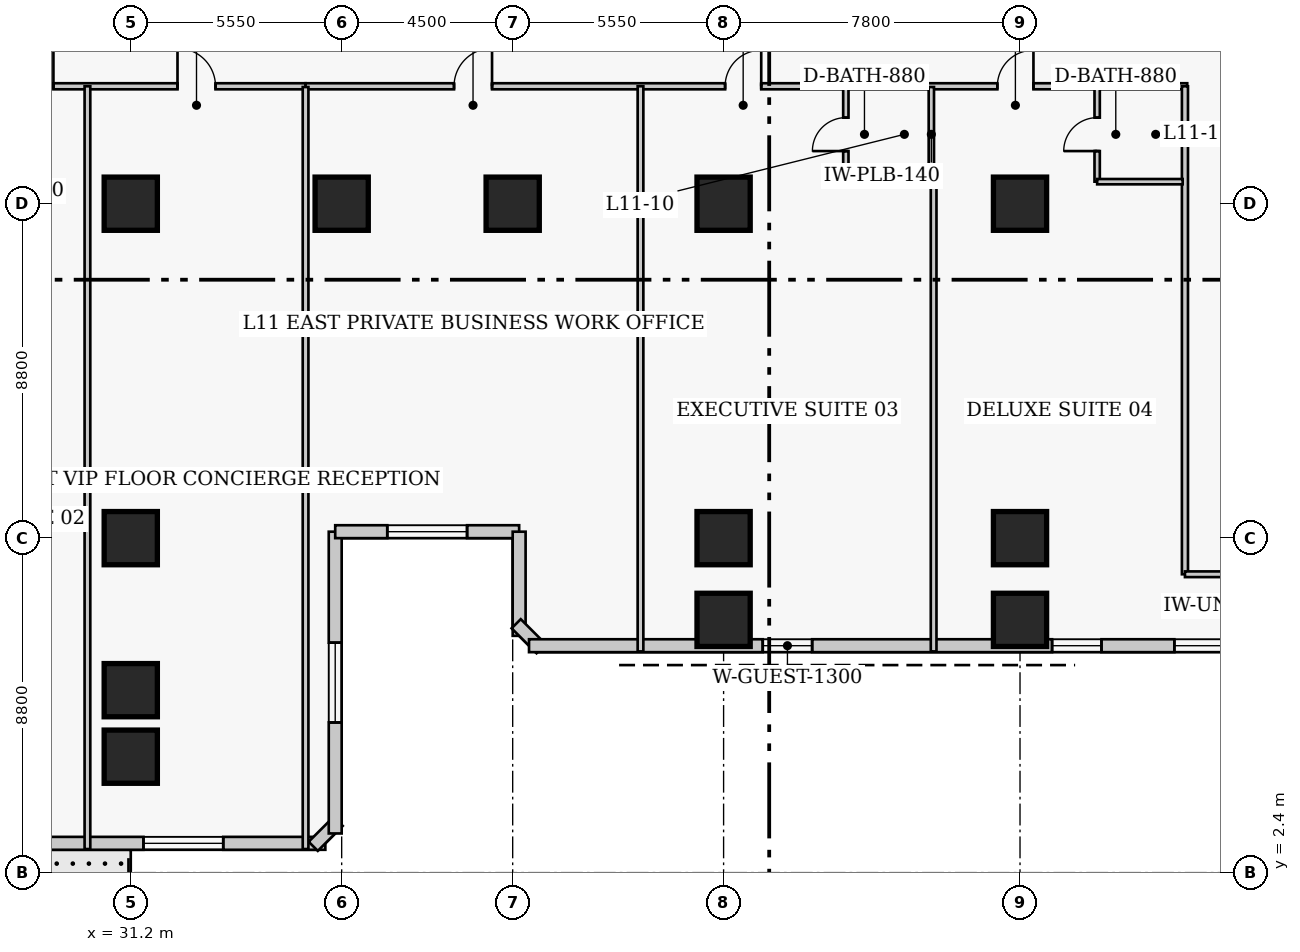
"""IFC4 building model, lengths in metres.
Left out: names, types, materials, properties, quantities, classifications, styles, units other than length and angle.
Written with IfcOpenShell. Run it as: python <this file> out.ifc"""

import sys

from ifc_helpers import new_model, si_unit, direction, frame, frame_2d, origin, origin_2d, place, context, subcontext, project, spatial, rectangle, extrude, element, fill, save


model = new_model("IFC4")
c1 = context("Model", 3, precision=1e-05, world=origin(), true_north=direction((0.0, 1.0)))
c2 = subcontext(c1, "Body", "Model", "MODEL_VIEW")
j1 = project(units=[si_unit("LENGTHUNIT", "METRE"), si_unit("PLANEANGLEUNIT", "RADIAN")], contexts=[c1])
p1 = place(None, origin())
s1 = spatial("IfcSite", under=j1, at=p1, CompositionType="ELEMENT")
p2 = place(p1, origin())
s2 = spatial("IfcBuilding", under=s1, at=p2, CompositionType="ELEMENT")
p3 = place(p2, frame((0.0, 0.0, 48.8)))
s3 = spatial("IfcBuildingStorey", under=s2, at=p3, CompositionType="ELEMENT", Elevation=48.8)
for number, where, z_axis, x_axis in (
    (1, (31.2, 11.2, 0.0), (0.0, 0.0, 1.0), (1.0, 0.0, 0.0)),
    (2, (31.2, 20.0, 0.0), (0.0, 0.0, 1.0), (1.0, 0.0, 0.0)),
    (3, (36.75, 20.0, 0.0), (0.0, 0.0, 1.0), (1.0, 0.0, 0.0)),
    (4, (41.25, 20.0, 0.0), (0.0, 0.0, 1.0), (1.0, 0.0, 0.0)),
    (5, (46.8, 11.2, 0.0), (0.0, 0.0, 1.0), (1.0, 0.0, 0.0)),
    (6, (46.8, 20.0, 0.0), (0.0, 0.0, 1.0), (1.0, 0.0, 0.0)),
    (7, (54.6, 11.2, 0.0), (0.0, 0.0, 1.0), (1.0, 0.0, 0.0)),
    (8, (54.6, 20.0, 0.0), (0.0, 0.0, 1.0), (1.0, 0.0, 0.0)),
    (9, (31.2, 7.2, 0.0), (0.0, 0.0, 1.0), (1.0, 0.0, 0.0)),
    (10, (31.2, 5.45, 0.0), (0.0, 0.0, 1.0), (1.0, 0.0, 0.0)),
    (11, (46.8, 9.05, 0.0), (0.0, 0.0, 1.0), (1.0, 0.0, 0.0)),
    (12, (54.6, 9.05, 0.0), (0.0, 0.0, 1.0), (1.0, 0.0, 0.0)),
):
    element("IfcColumn", number, at=place(p3, frame(where, z_axis=z_axis, x_axis=x_axis)), inside=s3, PredefinedType="COLUMN", context=c2, shape_type="SweptSolid", body=[
        extrude(rectangle(XDim=1.4, YDim=1.4, at=origin_2d()), origin(), (0.0, 0.0, 1.0), 3.8),
    ])
p4 = place(p3, frame((6.43, 3.17, 0.0), z_axis=(0.0, 0.0, 1.0), x_axis=(1.0, 0.0, 0.0)))
e13 = element("IfcWall", 13, at=p4, inside=s3, PredefinedType="SOLIDWALL", context=c2, shape_type="SweptSolid", body=[
    extrude(rectangle(XDim=29.89, YDim=0.34, at=frame_2d((14.945, 0.0))), origin(), (0.0, 0.0, 1.0), 3.54),
])
p5 = place(p4, frame((20.17, 0.0, 0.0)))
e14 = element("IfcOpeningElement", 14, at=p5, cuts=e13, PredefinedType="OPENING", context=c2, shape_type="SweptSolid", body=[
    extrude(rectangle(XDim=1.4, YDim=2.15, at=frame_2d((0.7, 1.075))), frame((0.0, 0.18, 0.0), z_axis=(0.0, -1.0, 0.0), x_axis=(1.0, 0.0, 0.0)), (0.0, 0.0, 1.0), 0.36),
])
p6 = place(p4, frame((2.686, 0.0, 0.85)))
e15 = element("IfcOpeningElement", 15, at=p6, cuts=e13, PredefinedType="OPENING", context=c2, shape_type="SweptSolid", body=[
    extrude(rectangle(XDim=2.1, YDim=1.85, at=frame_2d((1.05, 0.925))), frame((0.0, 0.18, 0.0), z_axis=(0.0, -1.0, 0.0), x_axis=(1.0, 0.0, 0.0)), (0.0, 0.0, 1.0), 0.36),
])
p7 = place(p4, frame((25.104, 0.0, 0.85)))
e16 = element("IfcOpeningElement", 16, at=p7, cuts=e13, PredefinedType="OPENING", context=c2, shape_type="SweptSolid", body=[
    extrude(rectangle(XDim=2.1, YDim=1.85, at=frame_2d((1.05, 0.925))), frame((0.0, 0.18, 0.0), z_axis=(0.0, -1.0, 0.0), x_axis=(1.0, 0.0, 0.0)), (0.0, 0.0, 1.0), 0.36),
])
p8 = place(p4, frame((15.405, 0.0, 0.85)))
e17 = element("IfcOpeningElement", 17, at=p8, cuts=e13, PredefinedType="OPENING", context=c2, shape_type="SweptSolid", body=[
    extrude(rectangle(XDim=1.3, YDim=1.7, at=frame_2d((0.65, 0.85))), frame((0.0, 0.18, 0.0), z_axis=(0.0, -1.0, 0.0), x_axis=(1.0, 0.0, 0.0)), (0.0, 0.0, 1.0), 0.36),
])
p9 = place(p3, frame((36.001, 3.092, 0.0), z_axis=(0.0, 0.0, 1.0), x_axis=(0.707106781187, 0.707106781187, 0.0)))
e18 = element("IfcWall", 18, at=p9, inside=s3, PredefinedType="SOLIDWALL", context=c2, shape_type="SweptSolid", body=[
    extrude(rectangle(XDim=0.929, YDim=0.34, at=frame_2d((0.464, 0.0))), origin(), (0.0, 0.0, 1.0), 3.54),
])
p10 = place(p3, frame((36.58, 3.43, 0.0), z_axis=(0.0, 0.0, 1.0), x_axis=(0.0, 1.0, 0.0)))
e19 = element("IfcWall", 19, at=p10, inside=s3, PredefinedType="SOLIDWALL", context=c2, shape_type="SweptSolid", body=[
    extrude(rectangle(XDim=7.94, YDim=0.34, at=frame_2d((3.97, 0.0))), origin(), (0.0, 0.0, 1.0), 3.54),
])
p11 = place(p10, frame((2.92, 0.0, 0.85)))
e20 = element("IfcOpeningElement", 20, at=p11, cuts=e19, PredefinedType="OPENING", context=c2, shape_type="SweptSolid", body=[
    extrude(rectangle(XDim=2.1, YDim=1.85, at=frame_2d((1.05, 0.925))), frame((0.0, 0.18, 0.0), z_axis=(0.0, -1.0, 0.0), x_axis=(1.0, 0.0, 0.0)), (0.0, 0.0, 1.0), 0.36),
])
p12 = place(p3, frame((36.58, 11.37, 0.0), z_axis=(0.0, 0.0, 1.0), x_axis=(1.0, 0.0, 0.0)))
e21 = element("IfcWall", 21, at=p12, inside=s3, PredefinedType="SOLIDWALL", context=c2, shape_type="SweptSolid", body=[
    extrude(rectangle(XDim=4.84, YDim=0.34, at=frame_2d((2.42, 0.0))), origin(), (0.0, 0.0, 1.0), 3.54),
])
p13 = place(p12, frame((1.37, 0.0, 0.85)))
e22 = element("IfcOpeningElement", 22, at=p13, cuts=e21, PredefinedType="OPENING", context=c2, shape_type="SweptSolid", body=[
    extrude(rectangle(XDim=2.1, YDim=1.85, at=frame_2d((1.05, 0.925))), frame((0.0, 0.18, 0.0), z_axis=(0.0, -1.0, 0.0), x_axis=(1.0, 0.0, 0.0)), (0.0, 0.0, 1.0), 0.36),
])
p14 = place(p3, frame((41.42, 11.37, 0.0), z_axis=(0.0, 0.0, 1.0), x_axis=(0.0, -1.0, 0.0)))
e23 = element("IfcWall", 23, at=p14, inside=s3, PredefinedType="SOLIDWALL", context=c2, shape_type="SweptSolid", body=[
    extrude(rectangle(XDim=2.74, YDim=0.34, at=frame_2d((1.37, 0.0))), origin(), (0.0, 0.0, 1.0), 3.54),
])
p15 = place(p3, frame((41.342, 8.948, 0.0), z_axis=(0.0, 0.0, 1.0), x_axis=(0.707238225886, -0.706975312048, 0.0)))
e24 = element("IfcWall", 24, at=p15, inside=s3, PredefinedType="SOLIDWALL", context=c2, shape_type="SweptSolid", body=[
    extrude(rectangle(XDim=0.929, YDim=0.34, at=frame_2d((0.464, 0.0))), origin(), (0.0, 0.0, 1.0), 3.54),
])
p16 = place(p3, frame((41.68, 8.37, 0.0), z_axis=(0.0, 0.0, 1.0), x_axis=(1.0, 0.0, 0.0)))
e25 = element("IfcWall", 25, at=p16, inside=s3, PredefinedType="SOLIDWALL", context=c2, shape_type="SweptSolid", body=[
    extrude(rectangle(XDim=29.89, YDim=0.34, at=frame_2d((14.945, 0.0))), origin(), (0.0, 0.0, 1.0), 3.54),
])
p17 = place(p16, frame((16.981, 0.0, 0.85)))
e26 = element("IfcOpeningElement", 26, at=p17, cuts=e25, PredefinedType="OPENING", context=c2, shape_type="SweptSolid", body=[
    extrude(rectangle(XDim=2.1, YDim=1.85, at=frame_2d((1.05, 0.925))), frame((0.0, 0.18, 0.0), z_axis=(0.0, -1.0, 0.0), x_axis=(1.0, 0.0, 0.0)), (0.0, 0.0, 1.0), 0.36),
])
p18 = place(p16, frame((26.254, 0.0, 0.85)))
e27 = element("IfcOpeningElement", 27, at=p18, cuts=e25, PredefinedType="OPENING", context=c2, shape_type="SweptSolid", body=[
    extrude(rectangle(XDim=2.1, YDim=1.85, at=frame_2d((1.05, 0.925))), frame((0.0, 0.18, 0.0), z_axis=(0.0, -1.0, 0.0), x_axis=(1.0, 0.0, 0.0)), (0.0, 0.0, 1.0), 0.36),
])
p19 = place(p16, frame((6.15, 0.0, 0.85)))
e28 = element("IfcOpeningElement", 28, at=p19, cuts=e25, PredefinedType="OPENING", context=c2, shape_type="SweptSolid", body=[
    extrude(rectangle(XDim=1.3, YDim=1.7, at=frame_2d((0.65, 0.85))), frame((0.0, 0.18, 0.0), z_axis=(0.0, -1.0, 0.0), x_axis=(1.0, 0.0, 0.0)), (0.0, 0.0, 1.0), 0.36),
])
p20 = place(p16, frame((13.763, 0.0, 0.85)))
e29 = element("IfcOpeningElement", 29, at=p20, cuts=e25, PredefinedType="OPENING", context=c2, shape_type="SweptSolid", body=[
    extrude(rectangle(XDim=1.3, YDim=1.7, at=frame_2d((0.65, 0.85))), frame((0.0, 0.18, 0.0), z_axis=(0.0, -1.0, 0.0), x_axis=(1.0, 0.0, 0.0)), (0.0, 0.0, 1.0), 0.36),
])
p21 = place(p3, frame((19.9, 23.09, 0.0), z_axis=(0.0, 0.0, 1.0), x_axis=(1.0, 0.0, 0.0)))
e30 = element("IfcWall", 30, at=p21, inside=s3, PredefinedType="PARTITIONING", context=c2, shape_type="SweptSolid", body=[
    extrude(rectangle(XDim=15.9, YDim=0.16, at=frame_2d((7.95, 0.0))), origin(), (0.0, 0.0, 1.0), 3.54),
])
p22 = place(p21, frame((3.265, 0.0, 0.0)))
e31 = element("IfcOpeningElement", 31, at=p22, cuts=e30, PredefinedType="OPENING", context=c2, shape_type="SweptSolid", body=[
    extrude(rectangle(XDim=0.95, YDim=2.1, at=frame_2d((0.475, 1.05))), frame((0.0, 0.09, 0.0), z_axis=(0.0, -1.0, 0.0), x_axis=(1.0, 0.0, 0.0)), (0.0, 0.0, 1.0), 0.18),
])
p23 = place(p21, frame((8.315, 0.0, 0.0)))
e32 = element("IfcOpeningElement", 32, at=p23, cuts=e30, PredefinedType="OPENING", context=c2, shape_type="SweptSolid", body=[
    extrude(rectangle(XDim=0.95, YDim=2.1, at=frame_2d((0.475, 1.05))), frame((0.0, 0.09, 0.0), z_axis=(0.0, -1.0, 0.0), x_axis=(1.0, 0.0, 0.0)), (0.0, 0.0, 1.0), 0.18),
])
p24 = place(p21, frame((12.53, 0.0, 0.0)))
e33 = element("IfcOpeningElement", 33, at=p24, cuts=e30, PredefinedType="OPENING", context=c2, shape_type="SweptSolid", body=[
    extrude(rectangle(XDim=1.0, YDim=2.15, at=frame_2d((0.5, 1.075))), frame((0.0, 0.09, 0.0), z_axis=(0.0, -1.0, 0.0), x_axis=(1.0, 0.0, 0.0)), (0.0, 0.0, 1.0), 0.18),
])
p25 = place(p3, frame((35.8, 23.09, 0.0), z_axis=(0.0, 0.0, 1.0), x_axis=(1.0, 0.0, 0.0)))
e34 = element("IfcWall", 34, at=p25, inside=s3, PredefinedType="PARTITIONING", context=c2, shape_type="SweptSolid", body=[
    extrude(rectangle(XDim=23.2, YDim=0.16, at=frame_2d((11.6, 0.0))), origin(), (0.0, 0.0, 1.0), 3.54),
])
p26 = place(p25, frame((3.907, 0.0, 0.0)))
e35 = element("IfcOpeningElement", 35, at=p26, cuts=e34, PredefinedType="OPENING", context=c2, shape_type="SweptSolid", body=[
    extrude(rectangle(XDim=1.0, YDim=2.15, at=frame_2d((0.5, 1.075))), frame((0.0, 0.09, 0.0), z_axis=(0.0, -1.0, 0.0), x_axis=(1.0, 0.0, 0.0)), (0.0, 0.0, 1.0), 0.18),
])
p27 = place(p25, frame((11.04, 0.0, 0.0)))
e36 = element("IfcOpeningElement", 36, at=p27, cuts=e34, PredefinedType="OPENING", context=c2, shape_type="SweptSolid", body=[
    extrude(rectangle(XDim=0.95, YDim=2.1, at=frame_2d((0.475, 1.05))), frame((0.0, 0.09, 0.0), z_axis=(0.0, -1.0, 0.0), x_axis=(1.0, 0.0, 0.0)), (0.0, 0.0, 1.0), 0.18),
])
p28 = place(p25, frame((18.203, 0.0, 0.0)))
e37 = element("IfcOpeningElement", 37, at=p28, cuts=e34, PredefinedType="OPENING", context=c2, shape_type="SweptSolid", body=[
    extrude(rectangle(XDim=0.95, YDim=2.1, at=frame_2d((0.475, 1.05))), frame((0.0, 0.09, 0.0), z_axis=(0.0, -1.0, 0.0), x_axis=(1.0, 0.0, 0.0)), (0.0, 0.0, 1.0), 0.18),
])
p29 = place(p3, frame((58.94, 10.25, 0.0), z_axis=(0.0, 0.0, 1.0), x_axis=(0.0, 1.0, 0.0)))
e38 = element("IfcWall", 38, at=p29, inside=s3, PredefinedType="PARTITIONING", context=c2, shape_type="SweptSolid", body=[
    extrude(rectangle(XDim=12.84, YDim=0.16, at=frame_2d((6.42, 0.0))), origin(), (0.0, 0.0, 1.0), 3.54),
])
p30 = place(p3, frame((58.94, 10.25, 0.0), z_axis=(0.0, 0.0, 1.0), x_axis=(1.0, 0.0, 0.0)))
e39 = element("IfcWall", 39, at=p30, inside=s3, PredefinedType="PARTITIONING", context=c2, shape_type="SweptSolid", body=[
    extrude(rectangle(XDim=2.22, YDim=0.15, at=frame_2d((1.11, 0.0))), origin(), (0.0, 0.0, 1.0), 3.54),
])
p31 = place(p3, frame((30.06, 3.02, 0.0), z_axis=(0.0, 0.0, 1.0), x_axis=(0.0, 1.0, 0.0)))
e40 = element("IfcWall", 40, at=p31, inside=s3, PredefinedType="PARTITIONING", context=c2, shape_type="SweptSolid", body=[
    extrude(rectangle(XDim=20.07, YDim=0.15, at=frame_2d((10.035, 0.0))), origin(), (0.0, 0.0, 1.0), 3.54),
])
p32 = place(p3, frame((35.8, 3.02, 0.0), z_axis=(0.0, 0.0, 1.0), x_axis=(0.0, 1.0, 0.0)))
e41 = element("IfcWall", 41, at=p32, inside=s3, PredefinedType="PARTITIONING", context=c2, shape_type="SweptSolid", body=[
    extrude(rectangle(XDim=20.05, YDim=0.15, at=frame_2d((10.025, 0.0))), origin(), (0.0, 0.0, 1.0), 3.54),
])
p33 = place(p3, frame((44.613, 8.22, 0.0), z_axis=(0.0, 0.0, 1.0), x_axis=(0.0, 1.0, 0.0)))
e42 = element("IfcWall", 42, at=p33, inside=s3, PredefinedType="PARTITIONING", context=c2, shape_type="SweptSolid", body=[
    extrude(rectangle(XDim=14.87, YDim=0.15, at=frame_2d((7.435, 0.0))), origin(), (0.0, 0.0, 1.0), 3.54),
])
p34 = place(p3, frame((50.017, 20.58, 0.0), z_axis=(0.0, 0.0, 1.0), x_axis=(0.0, 1.0, 0.0)))
e43 = element("IfcWall", 43, at=p34, inside=s3, PredefinedType="PLUMBINGWALL", context=c2, shape_type="SweptSolid", body=[
    extrude(rectangle(XDim=2.49, YDim=0.14, at=frame_2d((1.245, 0.0))), origin(), (0.0, 0.0, 1.0), 3.54),
])
p35 = place(p34, frame((0.805, 0.0, 0.0)))
e44 = element("IfcOpeningElement", 44, at=p35, cuts=e43, PredefinedType="OPENING", context=c2, shape_type="SweptSolid", body=[
    extrude(rectangle(XDim=0.88, YDim=2.05, at=frame_2d((0.44, 1.025))), frame((0.0, 0.08, 0.0), z_axis=(0.0, -1.0, 0.0), x_axis=(1.0, 0.0, 0.0)), (0.0, 0.0, 1.0), 0.16),
])
p36 = place(p3, frame((52.267, 20.58, 0.0), z_axis=(0.0, 0.0, 1.0), x_axis=(0.0, 1.0, 0.0)))
e45 = element("IfcWall", 45, at=p36, inside=s3, PredefinedType="PLUMBINGWALL", context=c2, shape_type="SweptSolid", body=[
    extrude(rectangle(XDim=2.49, YDim=0.14, at=frame_2d((1.245, 0.0))), origin(), (0.0, 0.0, 1.0), 3.54),
])
p37 = place(p3, frame((50.017, 20.58, 0.0), z_axis=(0.0, 0.0, 1.0), x_axis=(1.0, 0.0, 0.0)))
e46 = element("IfcWall", 46, at=p37, inside=s3, PredefinedType="PLUMBINGWALL", context=c2, shape_type="SweptSolid", body=[
    extrude(rectangle(XDim=2.25, YDim=0.14, at=frame_2d((1.125, 0.0))), origin(), (0.0, 0.0, 1.0), 3.54),
])
p38 = place(p3, frame((52.327, 8.22, 0.0), z_axis=(0.0, 0.0, 1.0), x_axis=(0.0, 1.0, 0.0)))
e47 = element("IfcWall", 47, at=p38, inside=s3, PredefinedType="PARTITIONING", context=c2, shape_type="SweptSolid", body=[
    extrude(rectangle(XDim=12.36, YDim=0.15, at=frame_2d((6.18, 0.0))), origin(), (0.0, 0.0, 1.0), 3.54),
])
p39 = place(p3, frame((56.63, 20.58, 0.0), z_axis=(0.0, 0.0, 1.0), x_axis=(0.0, 1.0, 0.0)))
e48 = element("IfcWall", 48, at=p39, inside=s3, PredefinedType="PLUMBINGWALL", context=c2, shape_type="SweptSolid", body=[
    extrude(rectangle(XDim=2.49, YDim=0.14, at=frame_2d((1.245, 0.0))), origin(), (0.0, 0.0, 1.0), 3.54),
])
p40 = place(p39, frame((0.805, 0.0, 0.0)))
e49 = element("IfcOpeningElement", 49, at=p40, cuts=e48, PredefinedType="OPENING", context=c2, shape_type="SweptSolid", body=[
    extrude(rectangle(XDim=0.88, YDim=2.05, at=frame_2d((0.44, 1.025))), frame((0.0, 0.08, 0.0), z_axis=(0.0, -1.0, 0.0), x_axis=(1.0, 0.0, 0.0)), (0.0, 0.0, 1.0), 0.16),
])
p41 = place(p3, frame((56.63, 20.58, 0.0), z_axis=(0.0, 0.0, 1.0), x_axis=(1.0, 0.0, 0.0)))
e50 = element("IfcWall", 50, at=p41, inside=s3, PredefinedType="PLUMBINGWALL", context=c2, shape_type="SweptSolid", body=[
    extrude(rectangle(XDim=2.25, YDim=0.14, at=frame_2d((1.125, 0.0))), origin(), (0.0, 0.0, 1.0), 3.54),
])
p42 = place(p7, origin())
e51 = element("IfcWindow", 51, at=p42, inside=s3, PartitioningType="SINGLE_PANEL", PredefinedType="WINDOW", context=c2, shape_type="SweptSolid", body=[
    extrude(rectangle(XDim=2.1, YDim=1.85, at=frame_2d((1.05, 0.925))), frame((0.0, 0.03, 0.0), z_axis=(0.0, -1.0, 0.0), x_axis=(1.0, 0.0, 0.0)), (0.0, 0.0, 1.0), 0.06),
])
fill(e16, e51)
p43 = place(p11, origin())
e52 = element("IfcWindow", 52, at=p43, inside=s3, PartitioningType="SINGLE_PANEL", PredefinedType="WINDOW", context=c2, shape_type="SweptSolid", body=[
    extrude(rectangle(XDim=2.1, YDim=1.85, at=frame_2d((1.05, 0.925))), frame((0.0, 0.03, 0.0), z_axis=(0.0, -1.0, 0.0), x_axis=(1.0, 0.0, 0.0)), (0.0, 0.0, 1.0), 0.06),
])
fill(e20, e52)
p44 = place(p13, origin())
e53 = element("IfcWindow", 53, at=p44, inside=s3, PartitioningType="SINGLE_PANEL", PredefinedType="WINDOW", context=c2, shape_type="SweptSolid", body=[
    extrude(rectangle(XDim=2.1, YDim=1.85, at=frame_2d((1.05, 0.925))), frame((0.0, 0.03, 0.0), z_axis=(0.0, -1.0, 0.0), x_axis=(1.0, 0.0, 0.0)), (0.0, 0.0, 1.0), 0.06),
])
fill(e22, e53)
p45 = place(p17, origin())
e54 = element("IfcWindow", 54, at=p45, inside=s3, PartitioningType="SINGLE_PANEL", PredefinedType="WINDOW", context=c2, shape_type="SweptSolid", body=[
    extrude(rectangle(XDim=2.1, YDim=1.85, at=frame_2d((1.05, 0.925))), frame((0.0, 0.03, 0.0), z_axis=(0.0, -1.0, 0.0), x_axis=(1.0, 0.0, 0.0)), (0.0, 0.0, 1.0), 0.06),
])
fill(e26, e54)
p46 = place(p19, origin())
e55 = element("IfcWindow", 55, at=p46, inside=s3, PartitioningType="SINGLE_PANEL", PredefinedType="WINDOW", context=c2, shape_type="SweptSolid", body=[
    extrude(rectangle(XDim=1.3, YDim=1.7, at=frame_2d((0.65, 0.85))), frame((0.0, 0.03, 0.0), z_axis=(0.0, -1.0, 0.0), x_axis=(1.0, 0.0, 0.0)), (0.0, 0.0, 1.0), 0.06),
])
fill(e28, e55)
p47 = place(p20, origin())
e56 = element("IfcWindow", 56, at=p47, inside=s3, PartitioningType="SINGLE_PANEL", PredefinedType="WINDOW", context=c2, shape_type="SweptSolid", body=[
    extrude(rectangle(XDim=1.3, YDim=1.7, at=frame_2d((0.65, 0.85))), frame((0.0, 0.03, 0.0), z_axis=(0.0, -1.0, 0.0), x_axis=(1.0, 0.0, 0.0)), (0.0, 0.0, 1.0), 0.06),
])
fill(e29, e56)
p48 = place(p23, origin())
e57 = element("IfcDoor", 57, at=p48, inside=s3, OperationType="SINGLE_SWING_RIGHT", PredefinedType="DOOR", context=c2, shape_type="SweptSolid", body=[
    extrude(rectangle(XDim=0.95, YDim=2.1, at=frame_2d((0.475, 1.05))), frame((0.0, 0.025, 0.0), z_axis=(0.0, -1.0, 0.0), x_axis=(1.0, 0.0, 0.0)), (0.0, 0.0, 1.0), 0.05),
])
fill(e32, e57)
p49 = place(p24, origin())
e58 = element("IfcDoor", 58, at=p49, inside=s3, OperationType="SINGLE_SWING_LEFT", PredefinedType="DOOR", context=c2, shape_type="SweptSolid", body=[
    extrude(rectangle(XDim=1.0, YDim=2.15, at=frame_2d((0.5, 1.075))), frame((0.0, 0.025, 0.0), z_axis=(0.0, -1.0, 0.0), x_axis=(1.0, 0.0, 0.0)), (0.0, 0.0, 1.0), 0.05),
])
fill(e33, e58)
p50 = place(p26, origin())
e59 = element("IfcDoor", 59, at=p50, inside=s3, OperationType="SINGLE_SWING_RIGHT", PredefinedType="DOOR", context=c2, shape_type="SweptSolid", body=[
    extrude(rectangle(XDim=1.0, YDim=2.15, at=frame_2d((0.5, 1.075))), frame((0.0, 0.025, 0.0), z_axis=(0.0, -1.0, 0.0), x_axis=(1.0, 0.0, 0.0)), (0.0, 0.0, 1.0), 0.05),
])
fill(e35, e59)
p51 = place(p35, origin())
e60 = element("IfcDoor", 60, at=p51, inside=s3, OperationType="SINGLE_SWING_LEFT", PredefinedType="DOOR", context=c2, shape_type="SweptSolid", body=[
    extrude(rectangle(XDim=0.88, YDim=2.05, at=frame_2d((0.44, 1.025))), frame((0.0, 0.025, 0.0), z_axis=(0.0, -1.0, 0.0), x_axis=(1.0, 0.0, 0.0)), (0.0, 0.0, 1.0), 0.05),
])
fill(e44, e60)
p52 = place(p27, origin())
e61 = element("IfcDoor", 61, at=p52, inside=s3, OperationType="SINGLE_SWING_RIGHT", PredefinedType="DOOR", context=c2, shape_type="SweptSolid", body=[
    extrude(rectangle(XDim=0.95, YDim=2.1, at=frame_2d((0.475, 1.05))), frame((0.0, 0.025, 0.0), z_axis=(0.0, -1.0, 0.0), x_axis=(1.0, 0.0, 0.0)), (0.0, 0.0, 1.0), 0.05),
])
fill(e36, e61)
p53 = place(p40, origin())
e62 = element("IfcDoor", 62, at=p53, inside=s3, OperationType="SINGLE_SWING_LEFT", PredefinedType="DOOR", context=c2, shape_type="SweptSolid", body=[
    extrude(rectangle(XDim=0.88, YDim=2.05, at=frame_2d((0.44, 1.025))), frame((0.0, 0.025, 0.0), z_axis=(0.0, -1.0, 0.0), x_axis=(1.0, 0.0, 0.0)), (0.0, 0.0, 1.0), 0.05),
])
fill(e49, e62)
p54 = place(p28, origin())
e63 = element("IfcDoor", 63, at=p54, inside=s3, OperationType="SINGLE_SWING_RIGHT", PredefinedType="DOOR", context=c2, shape_type="SweptSolid", body=[
    extrude(rectangle(XDim=0.95, YDim=2.1, at=frame_2d((0.475, 1.05))), frame((0.0, 0.025, 0.0), z_axis=(0.0, -1.0, 0.0), x_axis=(1.0, 0.0, 0.0)), (0.0, 0.0, 1.0), 0.05),
])
fill(e37, e63)
save(model, sys.argv[1])
